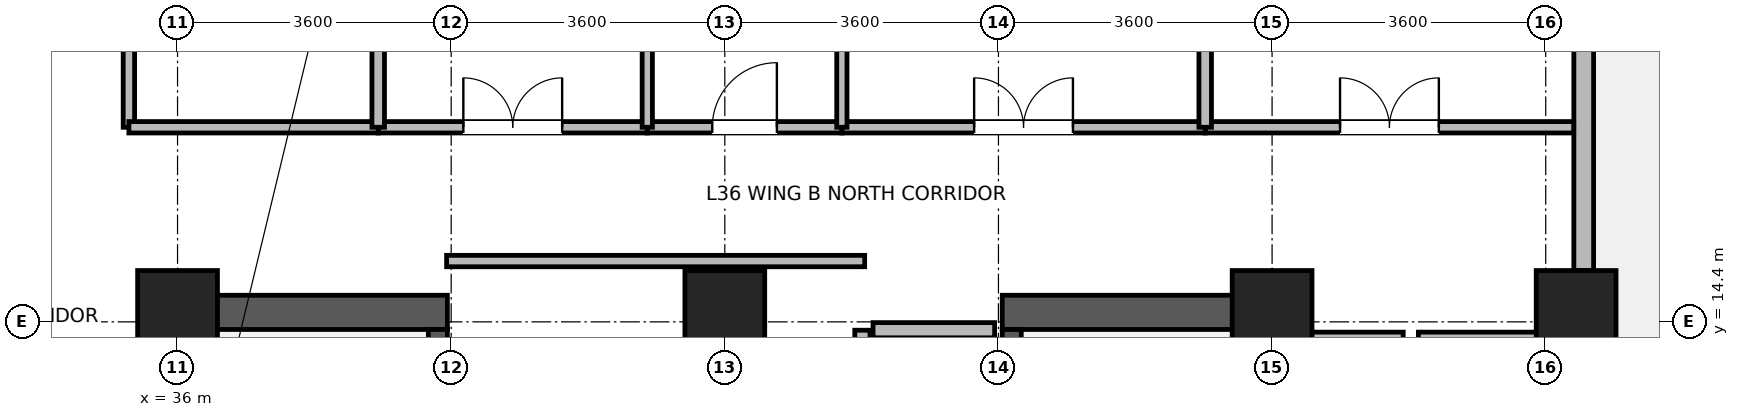
"""IFC4 building model, lengths in metres.
Left out: names, types, materials, properties, quantities, classifications, styles, units other than length and angle.
Written with IfcOpenShell. Run it as: python <this file> out.ifc"""

import sys

from ifc_helpers import new_model, si_unit, direction, frame, frame_2d, origin, origin_2d, place, context, subcontext, project, spatial, rectangle, extrude, source, transform, mapped, element, fill, save


model = new_model("IFC4")
c1 = context("Model", 3, precision=1e-05, world=origin(), true_north=direction((0.0, 1.0)))
c2 = subcontext(c1, "Body", "Model", "MODEL_VIEW")
j1 = project(units=[si_unit("LENGTHUNIT", "METRE"), si_unit("PLANEANGLEUNIT", "RADIAN")], contexts=[c1])
p1 = place(None, origin())
s1 = spatial("IfcSite", under=j1, at=p1, CompositionType="ELEMENT")
p2 = place(p1, origin())
s2 = spatial("IfcBuilding", under=s1, at=p2, CompositionType="ELEMENT")
p3 = place(p2, frame((0.0, 0.0, 143.9)))
s3 = spatial("IfcBuildingStorey", under=s2, at=p3, CompositionType="ELEMENT", Elevation=143.9)
for number, where, z_axis, x_axis in (
    (1, (36.125, 6.85, 0.0), (0.0, 0.0, 1.0), (0.0, 1.0, 0.0)),
    (2, (50.275, 6.85, 0.0), (0.0, 0.0, 1.0), (0.0, 1.0, 0.0)),
):
    element("IfcWall", number, at=place(p3, frame(where, z_axis=z_axis, x_axis=x_axis)), inside=s3, PredefinedType="SHEAR", context=c2, shape_type="SweptSolid", body=[
        extrude(rectangle(XDim=7.9, YDim=0.45, at=frame_2d((3.95, 0.0))), origin(), (0.0, 0.0, 1.0), 3.46),
    ])
for number, where, z_axis, x_axis in (
    (3, (36.35, 14.525, 0.0), (0.0, 0.0, 1.0), (1.0, 0.0, 0.0)),
    (4, (46.85, 14.525, 0.0), (0.0, 0.0, 1.0), (1.0, 0.0, 0.0)),
):
    element("IfcWall", number, at=place(p3, frame(where, z_axis=z_axis, x_axis=x_axis)), inside=s3, PredefinedType="SHEAR", context=c2, shape_type="SweptSolid", body=[
        extrude(rectangle(XDim=3.2, YDim=0.45, at=frame_2d((1.6, 0.0))), origin(), (0.0, 0.0, 1.0), 3.46),
    ])
p4 = place(p3, frame((39.425, 7.3, 0.0), z_axis=(0.0, 0.0, 1.0), x_axis=(0.0, 1.0, 0.0)))
e5 = element("IfcWall", 5, at=p4, inside=s3, PredefinedType="SHEAR", context=c2, shape_type="SweptSolid", body=[
    extrude(rectangle(XDim=7.0, YDim=0.25, at=frame_2d((3.5, 0.0))), origin(), (0.0, 0.0, 1.0), 3.46),
])
p5 = place(p4, frame((0.15, 0.0, 0.0)))
e6 = element("IfcOpeningElement", 6, at=p5, cuts=e5, PredefinedType="OPENING", context=c2, shape_type="SweptSolid", body=[
    extrude(rectangle(XDim=1.1, YDim=2.08, at=frame_2d((0.55, 1.04))), frame((0.0, 0.135, 0.0), z_axis=(0.0, -1.0, 0.0), x_axis=(1.0, 0.0, 0.0)), (0.0, 0.0, 1.0), 0.27),
])
p6 = place(p3, frame((46.975, 7.3, 0.0), z_axis=(0.0, 0.0, 1.0), x_axis=(0.0, 1.0, 0.0)))
e7 = element("IfcWall", 7, at=p6, inside=s3, PredefinedType="SHEAR", context=c2, shape_type="SweptSolid", body=[
    extrude(rectangle(XDim=7.0, YDim=0.25, at=frame_2d((3.5, 0.0))), origin(), (0.0, 0.0, 1.0), 3.46),
])
p7 = place(p6, frame((0.15, 0.0, 0.0)))
e8 = element("IfcOpeningElement", 8, at=p7, cuts=e7, PredefinedType="OPENING", context=c2, shape_type="SweptSolid", body=[
    extrude(rectangle(XDim=1.1, YDim=2.08, at=frame_2d((0.55, 1.04))), frame((0.0, 0.135, 0.0), z_axis=(0.0, -1.0, 0.0), x_axis=(1.0, 0.0, 0.0)), (0.0, 0.0, 1.0), 0.27),
])
m1 = source(origin(), c2, "Body", "SweptSolid", [
    extrude(rectangle(XDim=1.05, YDim=1.05, at=origin_2d()), origin(), (0.0, 0.0, 1.0), 3.7),
])
for number, where, z_axis, x_axis in (
    (9, (36.0, 14.55, 0.0), (0.0, 0.0, 1.0), (1.0, 0.0, 0.0)),
    (10, (43.2, 14.55, 0.0), (0.0, 0.0, 1.0), (1.0, 0.0, 0.0)),
    (11, (50.4, 14.55, 0.0), (0.0, 0.0, 1.0), (1.0, 0.0, 0.0)),
    (12, (54.4, 14.55, 0.0), (0.0, 0.0, 1.0), (1.0, 0.0, 0.0)),
):
    element("IfcColumn", number, at=place(p3, frame(where, z_axis=z_axis, x_axis=x_axis)), inside=s3, PredefinedType="COLUMN", context=c2, shape_type="MappedRepresentation", body=[
        mapped(m1, transform((0.0, 0.0, 0.0), x_axis=(1.0, 0.0, 0.0), y_axis=(0.0, 1.0, 0.0), z_axis=(0.0, 0.0, 1.0), scale=1.0)),
    ])
p8 = place(p3, frame((54.5, 21.074, 0.0), z_axis=(0.0, 0.0, 1.0), x_axis=(0.0, -1.0, 0.0)))
e13 = element("IfcWall", 13, at=p8, inside=s3, PredefinedType="STANDARD", context=c2, shape_type="SweptSolid", body=[
    extrude(rectangle(XDim=5.998, YDim=0.26, at=frame_2d((2.999, 0.0))), origin(), (0.0, 0.0, 1.0), 2.99),
])
p9 = place(p8, frame((0.6, 0.0, 0.85)))
e14 = element("IfcOpeningElement", 14, at=p9, cuts=e13, PredefinedType="OPENING", context=c2, shape_type="SweptSolid", body=[
    extrude(rectangle(XDim=1.8, YDim=1.85, at=frame_2d((0.9, 0.925))), frame((0.0, 0.14, 0.0), z_axis=(0.0, -1.0, 0.0), x_axis=(1.0, 0.0, 0.0)), (0.0, 0.0, 1.0), 0.28),
])
p10 = place(p3, frame((50.475, 14.165, 0.0), z_axis=(0.0, 0.0, 1.0), x_axis=(1.0, 0.0, 0.0)))
e15 = element("IfcWall", 15, at=p10, inside=s3, PredefinedType="PARTITIONING", context=c2, shape_type="SweptSolid", body=[
    extrude(rectangle(XDim=1.65, YDim=0.2, at=frame_2d((0.825, 0.0))), origin(), (0.0, 0.0, 1.0), 3.44),
])
p11 = place(p3, frame((52.325, 14.165, 0.0), z_axis=(0.0, 0.0, 1.0), x_axis=(1.0, 0.0, 0.0)))
e16 = element("IfcWall", 16, at=p11, inside=s3, PredefinedType="PARTITIONING", context=c2, shape_type="SweptSolid", body=[
    extrude(rectangle(XDim=1.65, YDim=0.2, at=frame_2d((0.825, 0.0))), origin(), (0.0, 0.0, 1.0), 3.44),
])
p12 = place(p3, frame((45.15, 14.29, 0.0), z_axis=(0.0, 0.0, 1.0), x_axis=(1.0, 0.0, 0.0)))
e17 = element("IfcWall", 17, at=p12, inside=s3, PredefinedType="PARTITIONING", context=c2, shape_type="SweptSolid", body=[
    extrude(rectangle(XDim=1.6, YDim=0.2, at=frame_2d((0.8, 0.0))), origin(), (0.0, 0.0, 1.0), 2.44),
])
p13 = place(p3, frame((45.01, 11.61, 0.0), z_axis=(0.0, 0.0, 1.0), x_axis=(0.0, 1.0, 0.0)))
e18 = element("IfcWall", 18, at=p13, inside=s3, PredefinedType="PARTITIONING", context=c2, shape_type="SweptSolid", body=[
    extrude(rectangle(XDim=2.68, YDim=0.2, at=frame_2d((1.34, 0.0))), origin(), (0.0, 0.0, 1.0), 3.44),
])
p14 = place(p3, frame((35.36, 16.96, 0.0), z_axis=(0.0, 0.0, 1.0), x_axis=(0.0, 1.0, 0.0)))
e19 = element("IfcWall", 19, at=p14, inside=s3, PredefinedType="PARTITIONING", context=c2, shape_type="SweptSolid", body=[
    extrude(rectangle(XDim=9.64, YDim=0.15, at=frame_2d((4.82, 0.0))), origin(), (0.0, 0.0, 1.0), 3.44),
])
p15 = place(p14, frame((2.435, 0.0, 0.0)))
e20 = element("IfcOpeningElement", 20, at=p15, cuts=e19, PredefinedType="OPENING", context=c2, shape_type="SweptSolid", body=[
    extrude(rectangle(XDim=1.3, YDim=2.12, at=frame_2d((0.65, 1.06))), frame((0.0, 0.085, 0.0), z_axis=(0.0, -1.0, 0.0), x_axis=(1.0, 0.0, 0.0)), (0.0, 0.0, 1.0), 0.17),
])
p16 = place(p3, frame((39.54, 15.2, 0.0), z_axis=(0.0, 0.0, 1.0), x_axis=(1.0, 0.0, 0.0)))
e21 = element("IfcWall", 21, at=p16, inside=s3, PredefinedType="PARTITIONING", context=c2, shape_type="SweptSolid", body=[
    extrude(rectangle(XDim=5.5, YDim=0.15, at=frame_2d((2.75, 0.0))), origin(), (0.0, 0.0, 1.0), 3.44),
])
p17 = place(p3, frame((49.52, 16.96, 0.0), z_axis=(0.0, 0.0, 1.0), x_axis=(1.0, 0.0, 0.0)))
e22 = element("IfcWall", 22, at=p17, inside=s3, PredefinedType="PARTITIONING", context=c2, shape_type="SweptSolid", body=[
    extrude(rectangle(XDim=4.848, YDim=0.15, at=frame_2d((2.424, 0.0))), origin(), (0.0, 0.0, 1.0), 3.44),
])
p18 = place(p17, frame((1.774, 0.0, 0.0)))
e23 = element("IfcOpeningElement", 23, at=p18, cuts=e22, PredefinedType="OPENING", context=c2, shape_type="SweptSolid", body=[
    extrude(rectangle(XDim=1.3, YDim=2.12, at=frame_2d((0.65, 1.06))), frame((0.0, 0.085, 0.0), z_axis=(0.0, -1.0, 0.0), x_axis=(1.0, 0.0, 0.0)), (0.0, 0.0, 1.0), 0.17),
])
p19 = place(p3, frame((44.74, 16.96, 0.0), z_axis=(0.0, 0.0, 1.0), x_axis=(1.0, 0.0, 0.0)))
e24 = element("IfcWall", 24, at=p19, inside=s3, PredefinedType="PARTITIONING", context=c2, shape_type="SweptSolid", body=[
    extrude(rectangle(XDim=4.78, YDim=0.15, at=frame_2d((2.39, 0.0))), origin(), (0.0, 0.0, 1.0), 3.44),
])
p20 = place(p19, frame((1.74, 0.0, 0.0)))
e25 = element("IfcOpeningElement", 25, at=p20, cuts=e24, PredefinedType="OPENING", context=c2, shape_type="SweptSolid", body=[
    extrude(rectangle(XDim=1.3, YDim=2.12, at=frame_2d((0.65, 1.06))), frame((0.0, 0.085, 0.0), z_axis=(0.0, -1.0, 0.0), x_axis=(1.0, 0.0, 0.0)), (0.0, 0.0, 1.0), 0.17),
])
p21 = place(p3, frame((38.64, 16.96, 0.0), z_axis=(0.0, 0.0, 1.0), x_axis=(1.0, 0.0, 0.0)))
e26 = element("IfcWall", 26, at=p21, inside=s3, PredefinedType="PARTITIONING", context=c2, shape_type="SweptSolid", body=[
    extrude(rectangle(XDim=3.54, YDim=0.15, at=frame_2d((1.77, 0.0))), origin(), (0.0, 0.0, 1.0), 3.44),
])
p22 = place(p21, frame((1.12, 0.0, 0.0)))
e27 = element("IfcOpeningElement", 27, at=p22, cuts=e26, PredefinedType="OPENING", context=c2, shape_type="SweptSolid", body=[
    extrude(rectangle(XDim=1.3, YDim=2.12, at=frame_2d((0.65, 1.06))), frame((0.0, 0.085, 0.0), z_axis=(0.0, -1.0, 0.0), x_axis=(1.0, 0.0, 0.0)), (0.0, 0.0, 1.0), 0.17),
])
p23 = place(p3, frame((35.36, 16.96, 0.0), z_axis=(0.0, 0.0, 1.0), x_axis=(1.0, 0.0, 0.0)))
e28 = element("IfcWall", 28, at=p23, inside=s3, PredefinedType="PARTITIONING", context=c2, shape_type="SweptSolid", body=[
    extrude(rectangle(XDim=3.28, YDim=0.15, at=frame_2d((1.64, 0.0))), origin(), (0.0, 0.0, 1.0), 3.44),
])
p24 = place(p3, frame((42.18, 16.96, 0.0), z_axis=(0.0, 0.0, 1.0), x_axis=(1.0, 0.0, 0.0)))
e29 = element("IfcWall", 29, at=p24, inside=s3, PredefinedType="PARTITIONING", context=c2, shape_type="SweptSolid", body=[
    extrude(rectangle(XDim=2.56, YDim=0.15, at=frame_2d((1.28, 0.0))), origin(), (0.0, 0.0, 1.0), 3.44),
])
p25 = place(p24, frame((0.855, 0.0, 0.0)))
e30 = element("IfcOpeningElement", 30, at=p25, cuts=e29, PredefinedType="OPENING", context=c2, shape_type="SweptSolid", body=[
    extrude(rectangle(XDim=0.85, YDim=2.04, at=frame_2d((0.425, 1.02))), frame((0.0, 0.085, 0.0), z_axis=(0.0, -1.0, 0.0), x_axis=(1.0, 0.0, 0.0)), (0.0, 0.0, 1.0), 0.17),
])
p26 = place(p3, frame((38.64, 16.96, 0.0), z_axis=(0.0, 0.0, 1.0), x_axis=(0.0, 1.0, 0.0)))
e31 = element("IfcWall", 31, at=p26, inside=s3, PredefinedType="PARTITIONING", context=c2, shape_type="SweptSolid", body=[
    extrude(rectangle(XDim=9.64, YDim=0.165, at=frame_2d((4.82, 0.0))), origin(), (0.0, 0.0, 1.0), 3.44),
])
for number, where, z_axis, x_axis in (
    (32, (42.18, 16.96, 0.0), (0.0, 0.0, 1.0), (0.0, 1.0, 0.0)),
    (33, (44.74, 16.96, 0.0), (0.0, 0.0, 1.0), (0.0, 1.0, 0.0)),
):
    element("IfcWall", number, at=place(p3, frame(where, z_axis=z_axis, x_axis=x_axis)), inside=s3, PredefinedType="PARTITIONING", context=c2, shape_type="SweptSolid", body=[
        extrude(rectangle(XDim=9.64, YDim=0.135, at=frame_2d((4.82, 0.0))), origin(), (0.0, 0.0, 1.0), 3.44),
    ])
p27 = place(p3, frame((49.52, 16.96, 0.0), z_axis=(0.0, 0.0, 1.0), x_axis=(0.0, 1.0, 0.0)))
e34 = element("IfcWall", 34, at=p27, inside=s3, PredefinedType="PARTITIONING", context=c2, shape_type="SweptSolid", body=[
    extrude(rectangle(XDim=9.64, YDim=0.165, at=frame_2d((4.82, 0.0))), origin(), (0.0, 0.0, 1.0), 3.44),
])
p28 = place(p18, origin())
e35 = element("IfcDoor", 35, at=p28, inside=s3, OperationType="DOUBLE_DOOR_SINGLE_SWING", PredefinedType="DOOR", context=c2, shape_type="SweptSolid", body=[
    extrude(rectangle(XDim=1.3, YDim=2.12, at=frame_2d((0.65, 1.06))), frame((0.0, 0.025, 0.0), z_axis=(0.0, -1.0, 0.0), x_axis=(1.0, 0.0, 0.0)), (0.0, 0.0, 1.0), 0.05),
])
fill(e23, e35)
p29 = place(p20, origin())
e36 = element("IfcDoor", 36, at=p29, inside=s3, OperationType="DOUBLE_DOOR_SINGLE_SWING", PredefinedType="DOOR", context=c2, shape_type="SweptSolid", body=[
    extrude(rectangle(XDim=1.3, YDim=2.12, at=frame_2d((0.65, 1.06))), frame((0.0, 0.025, 0.0), z_axis=(0.0, -1.0, 0.0), x_axis=(1.0, 0.0, 0.0)), (0.0, 0.0, 1.0), 0.05),
])
fill(e25, e36)
p30 = place(p22, origin())
e37 = element("IfcDoor", 37, at=p30, inside=s3, OperationType="DOUBLE_DOOR_SINGLE_SWING", PredefinedType="DOOR", context=c2, shape_type="SweptSolid", body=[
    extrude(rectangle(XDim=1.3, YDim=2.12, at=frame_2d((0.65, 1.06))), frame((0.0, 0.025, 0.0), z_axis=(0.0, -1.0, 0.0), x_axis=(1.0, 0.0, 0.0)), (0.0, 0.0, 1.0), 0.05),
])
fill(e27, e37)
p31 = place(p25, origin())
e38 = element("IfcDoor", 38, at=p31, inside=s3, OperationType="SINGLE_SWING_RIGHT", PredefinedType="DOOR", context=c2, shape_type="SweptSolid", body=[
    extrude(rectangle(XDim=0.85, YDim=2.04, at=frame_2d((0.425, 1.02))), frame((0.0, 0.025, 0.0), z_axis=(0.0, -1.0, 0.0), x_axis=(1.0, 0.0, 0.0)), (0.0, 0.0, 1.0), 0.05),
])
fill(e30, e38)
save(model, sys.argv[1])
